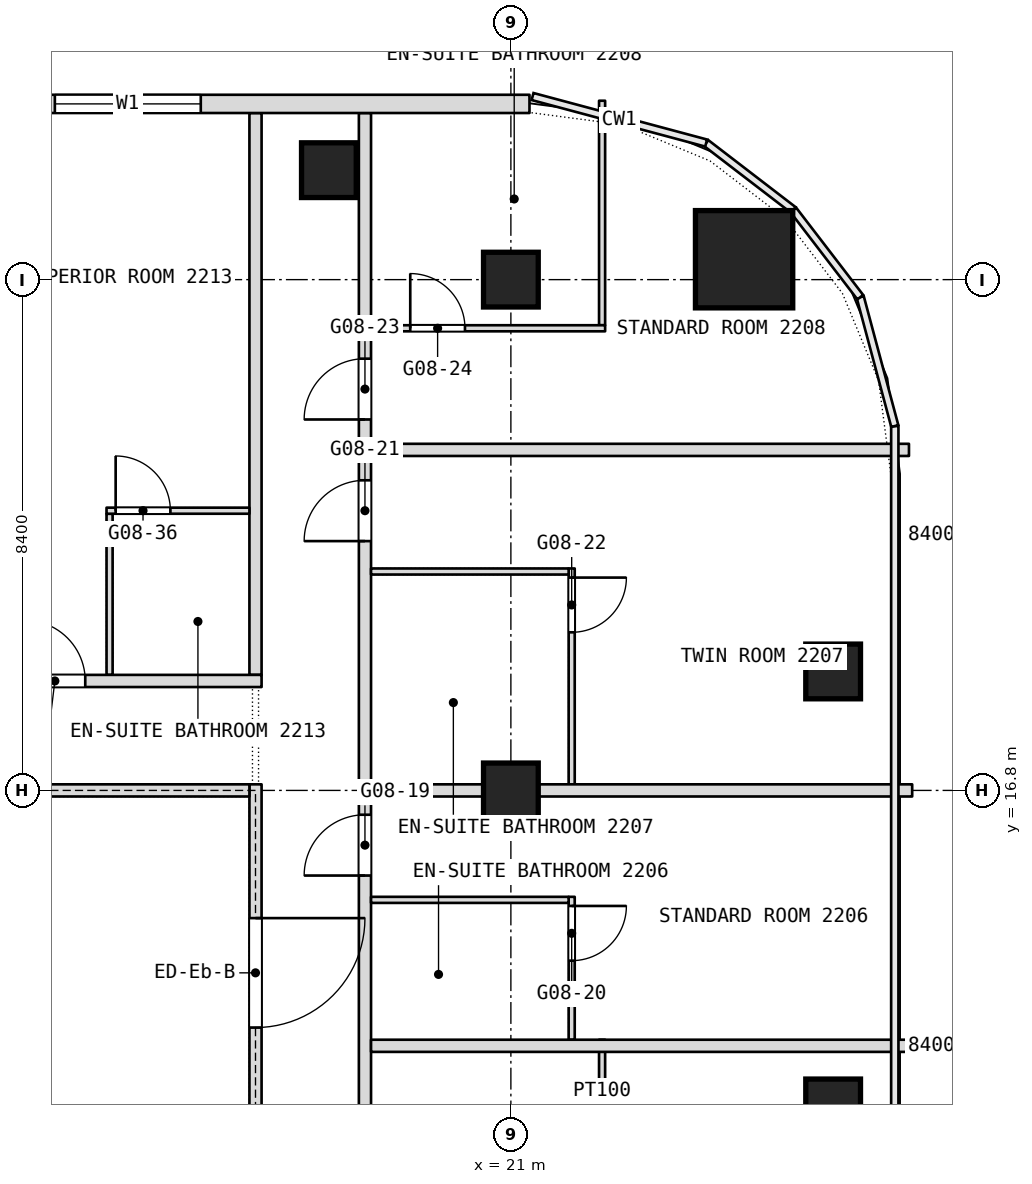
"""IFC4 building model, lengths in metres.
Left out: names, types, materials, properties, quantities, classifications, styles, units other than length and angle.
Written with IfcOpenShell. Run it as: python <this file> out.ifc"""

import sys

from ifc_helpers import new_model, si_unit, direction, frame, frame_2d, origin, origin_2d, place, context, subcontext, project, spatial, rectangle, extrude, element, fill, save


model = new_model("IFC4")
c1 = context("Model", 3, precision=1e-05, world=origin(), true_north=direction((0.0, 1.0)))
c2 = subcontext(c1, "Body", "Model", "MODEL_VIEW")
j1 = project(units=[si_unit("LENGTHUNIT", "METRE"), si_unit("PLANEANGLEUNIT", "RADIAN")], contexts=[c1])
p1 = place(None, origin())
s1 = spatial("IfcSite", under=j1, at=p1, CompositionType="ELEMENT")
p2 = place(p1, origin())
s2 = spatial("IfcBuilding", under=s1, at=p2, CompositionType="ELEMENT")
p3 = place(p2, frame((0.0, 0.0, 104.9)))
s3 = spatial("IfcBuildingStorey", under=s2, at=p3, CompositionType="ELEMENT", Elevation=104.9)
p4 = place(p3, frame((24.835, 25.535, 0.0), z_axis=(0.0, 0.0, 1.0), x_axis=(1.0, 0.0, 0.0)))
e1 = element("IfcColumn", 1, at=p4, inside=s3, PredefinedType="COLUMN", context=c2, shape_type="SweptSolid", body=[
    extrude(rectangle(XDim=1.6, YDim=1.6, at=origin_2d()), origin(), (0.0, 0.0, 1.0), 3.6),
])
for number, where, z_axis, x_axis in (
    (2, (21.0, 16.8, 0.0), (0.0, 0.0, 1.0), (1.0, 0.0, 0.0)),
    (3, (21.0, 25.2, 0.0), (0.0, 0.0, 1.0), (1.0, 0.0, 0.0)),
    (4, (18.007, 27.0, 0.0), (0.0, 0.0, 1.0), (1.0, 0.0, 0.0)),
    (5, (26.3, 18.756, 0.0), (0.0, 0.0, 1.0), (1.0, 0.0, 0.0)),
    (6, (26.3, 11.603, 0.0), (0.0, 0.0, 1.0), (1.0, 0.0, 0.0)),
):
    element("IfcColumn", number, at=place(p3, frame(where, z_axis=z_axis, x_axis=x_axis)), inside=s3, PredefinedType="COLUMN", context=c2, shape_type="SweptSolid", body=[
        extrude(rectangle(XDim=0.9, YDim=0.9, at=origin_2d()), origin(), (0.0, 0.0, 1.0), 3.6),
    ])
p5 = place(p3, frame((22.5, 10.25, 0.0), z_axis=(0.0, 0.0, 1.0), x_axis=(0.0, 1.0, 0.0)))
e7 = element("IfcWall", 7, at=p5, inside=s3, PredefinedType="PARTITIONING", context=c2, shape_type="SweptSolid", body=[
    extrude(rectangle(XDim=2.45, YDim=0.1, at=frame_2d((1.225, 0.0))), origin(), (0.0, 0.0, 1.0), 3.34),
])
p6 = place(p5, frame((0.15, 0.0, 0.0)))
e8 = element("IfcOpeningElement", 8, at=p6, cuts=e7, PredefinedType="OPENING", context=c2, shape_type="SweptSolid", body=[
    extrude(rectangle(XDim=0.9, YDim=2.1, at=frame_2d((0.45, 1.05))), frame((0.0, 0.05, 0.0), z_axis=(0.0, -1.0, 0.0), x_axis=(1.0, 0.0, 0.0)), (0.0, 0.0, 1.0), 0.1),
])
p7 = place(p3, frame((22.5, 24.45, 0.0), z_axis=(0.0, 0.0, 1.0), x_axis=(0.0, 1.0, 0.0)))
e9 = element("IfcWall", 9, at=p7, inside=s3, PredefinedType="PARTITIONING", context=c2, shape_type="SweptSolid", body=[
    extrude(rectangle(XDim=3.692, YDim=0.1, at=frame_2d((1.846, 0.0))), origin(), (0.0, 0.0, 1.0), 3.34),
])
p8 = place(p3, frame((22.0, 12.7, 0.0), z_axis=(0.0, 0.0, 1.0), x_axis=(0.0, 1.0, 0.0)))
e10 = element("IfcWall", 10, at=p8, inside=s3, PredefinedType="PARTITIONING", context=c2, shape_type="SweptSolid", body=[
    extrude(rectangle(XDim=2.35, YDim=0.1, at=frame_2d((1.175, 0.0))), origin(), (0.0, 0.0, 1.0), 3.34),
])
p9 = place(p8, frame((1.3, 0.0, 0.0)))
e11 = element("IfcOpeningElement", 11, at=p9, cuts=e10, PredefinedType="OPENING", context=c2, shape_type="SweptSolid", body=[
    extrude(rectangle(XDim=0.9, YDim=2.1, at=frame_2d((0.45, 1.05))), frame((0.0, 0.05, 0.0), z_axis=(0.0, -1.0, 0.0), x_axis=(1.0, 0.0, 0.0)), (0.0, 0.0, 1.0), 0.1),
])
p10 = place(p3, frame((22.0, 16.9, 0.0), z_axis=(0.0, 0.0, 1.0), x_axis=(0.0, 1.0, 0.0)))
e12 = element("IfcWall", 12, at=p10, inside=s3, PredefinedType="PARTITIONING", context=c2, shape_type="SweptSolid", body=[
    extrude(rectangle(XDim=3.55, YDim=0.1, at=frame_2d((1.775, 0.0))), origin(), (0.0, 0.0, 1.0), 3.34),
])
p11 = place(p10, frame((2.5, 0.0, 0.0)))
e13 = element("IfcOpeningElement", 13, at=p11, cuts=e12, PredefinedType="OPENING", context=c2, shape_type="SweptSolid", body=[
    extrude(rectangle(XDim=0.9, YDim=2.1, at=frame_2d((0.45, 1.05))), frame((0.0, 0.05, 0.0), z_axis=(0.0, -1.0, 0.0), x_axis=(1.0, 0.0, 0.0)), (0.0, 0.0, 1.0), 0.1),
])
p12 = place(p3, frame((18.6, -21.708, 0.0), z_axis=(0.0, 0.0, 1.0), x_axis=(0.0, 1.0, 0.0)))
e14 = element("IfcWall", 14, at=p12, inside=s3, PredefinedType="PARTITIONING", context=c2, shape_type="SweptSolid", body=[
    extrude(rectangle(XDim=49.648, YDim=0.2, at=frame_2d((24.824, 0.0))), origin(), (0.0, 0.0, 1.0), 3.34),
])
p13 = place(p12, frame((2.204, 0.0, 0.0)))
e15 = element("IfcOpeningElement", 15, at=p13, cuts=e14, PredefinedType="OPENING", context=c2, shape_type="SweptSolid", body=[
    extrude(rectangle(XDim=1.0, YDim=2.1, at=frame_2d((0.5, 1.05))), frame((0.0, 0.1, 0.0), z_axis=(0.0, -1.0, 0.0), x_axis=(1.0, 0.0, 0.0)), (0.0, 0.0, 1.0), 0.2),
])
p14 = place(p12, frame((7.708, 0.0, 0.0)))
e16 = element("IfcOpeningElement", 16, at=p14, cuts=e14, PredefinedType="OPENING", context=c2, shape_type="SweptSolid", body=[
    extrude(rectangle(XDim=1.0, YDim=2.1, at=frame_2d((0.5, 1.05))), frame((0.0, 0.1, 0.0), z_axis=(0.0, -1.0, 0.0), x_axis=(1.0, 0.0, 0.0)), (0.0, 0.0, 1.0), 0.2),
])
p15 = place(p12, frame((9.508, 0.0, 0.0)))
e17 = element("IfcOpeningElement", 17, at=p15, cuts=e14, PredefinedType="OPENING", context=c2, shape_type="SweptSolid", body=[
    extrude(rectangle(XDim=1.0, YDim=2.1, at=frame_2d((0.5, 1.05))), frame((0.0, 0.1, 0.0), z_axis=(0.0, -1.0, 0.0), x_axis=(1.0, 0.0, 0.0)), (0.0, 0.0, 1.0), 0.2),
])
p16 = place(p12, frame((13.708, 0.0, 0.0)))
e18 = element("IfcOpeningElement", 18, at=p16, cuts=e14, PredefinedType="OPENING", context=c2, shape_type="SweptSolid", body=[
    extrude(rectangle(XDim=1.0, YDim=2.1, at=frame_2d((0.5, 1.05))), frame((0.0, 0.1, 0.0), z_axis=(0.0, -1.0, 0.0), x_axis=(1.0, 0.0, 0.0)), (0.0, 0.0, 1.0), 0.2),
])
p17 = place(p12, frame((20.308, 0.0, 0.0)))
e19 = element("IfcOpeningElement", 19, at=p17, cuts=e14, PredefinedType="OPENING", context=c2, shape_type="SweptSolid", body=[
    extrude(rectangle(XDim=1.0, YDim=2.1, at=frame_2d((0.5, 1.05))), frame((0.0, 0.1, 0.0), z_axis=(0.0, -1.0, 0.0), x_axis=(1.0, 0.0, 0.0)), (0.0, 0.0, 1.0), 0.2),
])
p18 = place(p12, frame((25.008, 0.0, 0.0)))
e20 = element("IfcOpeningElement", 20, at=p18, cuts=e14, PredefinedType="OPENING", context=c2, shape_type="SweptSolid", body=[
    extrude(rectangle(XDim=1.8, YDim=2.1, at=frame_2d((0.9, 1.05))), frame((0.0, 0.1, 0.0), z_axis=(0.0, -1.0, 0.0), x_axis=(1.0, 0.0, 0.0)), (0.0, 0.0, 1.0), 0.2),
])
p19 = place(p12, frame((30.508, 0.0, 0.0)))
e21 = element("IfcOpeningElement", 21, at=p19, cuts=e14, PredefinedType="OPENING", context=c2, shape_type="SweptSolid", body=[
    extrude(rectangle(XDim=1.0, YDim=2.1, at=frame_2d((0.5, 1.05))), frame((0.0, 0.1, 0.0), z_axis=(0.0, -1.0, 0.0), x_axis=(1.0, 0.0, 0.0)), (0.0, 0.0, 1.0), 0.2),
])
p20 = place(p12, frame((37.108, 0.0, 0.0)))
e22 = element("IfcOpeningElement", 22, at=p20, cuts=e14, PredefinedType="OPENING", context=c2, shape_type="SweptSolid", body=[
    extrude(rectangle(XDim=1.0, YDim=2.1, at=frame_2d((0.5, 1.05))), frame((0.0, 0.1, 0.0), z_axis=(0.0, -1.0, 0.0), x_axis=(1.0, 0.0, 0.0)), (0.0, 0.0, 1.0), 0.2),
])
p21 = place(p12, frame((42.608, 0.0, 0.0)))
e23 = element("IfcOpeningElement", 23, at=p21, cuts=e14, PredefinedType="OPENING", context=c2, shape_type="SweptSolid", body=[
    extrude(rectangle(XDim=1.0, YDim=2.1, at=frame_2d((0.5, 1.05))), frame((0.0, 0.1, 0.0), z_axis=(0.0, -1.0, 0.0), x_axis=(1.0, 0.0, 0.0)), (0.0, 0.0, 1.0), 0.2),
])
p22 = place(p12, frame((44.608, 0.0, 0.0)))
e24 = element("IfcOpeningElement", 24, at=p22, cuts=e14, PredefinedType="OPENING", context=c2, shape_type="SweptSolid", body=[
    extrude(rectangle(XDim=1.0, YDim=2.1, at=frame_2d((0.5, 1.05))), frame((0.0, 0.1, 0.0), z_axis=(0.0, -1.0, 0.0), x_axis=(1.0, 0.0, 0.0)), (0.0, 0.0, 1.0), 0.2),
])
p23 = place(p3, frame((16.8, 18.7, 0.0), z_axis=(0.0, 0.0, 1.0), x_axis=(0.0, 1.0, 0.0)))
e25 = element("IfcWall", 25, at=p23, inside=s3, PredefinedType="PARTITIONING", context=c2, shape_type="SweptSolid", body=[
    extrude(rectangle(XDim=9.24, YDim=0.2, at=frame_2d((4.62, 0.0))), origin(), (0.0, 0.0, 1.0), 3.34),
])
p24 = place(p3, frame((14.4, 18.7, 0.0), z_axis=(0.0, 0.0, 1.0), x_axis=(0.0, 1.0, 0.0)))
e26 = element("IfcWall", 26, at=p24, inside=s3, PredefinedType="PARTITIONING", context=c2, shape_type="SweptSolid", body=[
    extrude(rectangle(XDim=2.65, YDim=0.1, at=frame_2d((1.325, 0.0))), origin(), (0.0, 0.0, 1.0), 3.34),
])
p25 = place(p3, frame((18.7, 12.6, 0.0), z_axis=(0.0, 0.0, 1.0), x_axis=(1.0, 0.0, 0.0)))
e27 = element("IfcWall", 27, at=p25, inside=s3, PredefinedType="PARTITIONING", context=c2, shape_type="SweptSolid", body=[
    extrude(rectangle(XDim=8.9, YDim=0.2, at=frame_2d((4.45, 0.0))), origin(), (0.0, 0.0, 1.0), 3.34),
])
p26 = place(p3, frame((18.7, 15.0, 0.0), z_axis=(0.0, 0.0, 1.0), x_axis=(1.0, 0.0, 0.0)))
e28 = element("IfcWall", 28, at=p26, inside=s3, PredefinedType="PARTITIONING", context=c2, shape_type="SweptSolid", body=[
    extrude(rectangle(XDim=3.25, YDim=0.1, at=frame_2d((1.625, 0.0))), origin(), (0.0, 0.0, 1.0), 3.34),
])
p27 = place(p3, frame((18.7, 16.8, 0.0), z_axis=(0.0, 0.0, 1.0), x_axis=(1.0, 0.0, 0.0)))
e29 = element("IfcWall", 29, at=p27, inside=s3, PredefinedType="PARTITIONING", context=c2, shape_type="SweptSolid", body=[
    extrude(rectangle(XDim=8.9, YDim=0.2, at=frame_2d((4.45, 0.0))), origin(), (0.0, 0.0, 1.0), 2.89),
])
p28 = place(p3, frame((10.7, 18.6, 0.0), z_axis=(0.0, 0.0, 1.0), x_axis=(1.0, 0.0, 0.0)))
e30 = element("IfcWall", 30, at=p28, inside=s3, PredefinedType="PARTITIONING", context=c2, shape_type="SweptSolid", body=[
    extrude(rectangle(XDim=6.2, YDim=0.2, at=frame_2d((3.1, 0.0))), origin(), (0.0, 0.0, 1.0), 3.34),
])
p29 = place(p28, frame((2.3, 0.0, 0.0)))
e31 = element("IfcOpeningElement", 31, at=p29, cuts=e30, PredefinedType="OPENING", context=c2, shape_type="SweptSolid", body=[
    extrude(rectangle(XDim=1.0, YDim=2.1, at=frame_2d((0.5, 1.05))), frame((0.0, 0.1, 0.0), z_axis=(0.0, -1.0, 0.0), x_axis=(1.0, 0.0, 0.0)), (0.0, 0.0, 1.0), 0.2),
])
p30 = place(p3, frame((18.7, 20.4, 0.0), z_axis=(0.0, 0.0, 1.0), x_axis=(1.0, 0.0, 0.0)))
e32 = element("IfcWall", 32, at=p30, inside=s3, PredefinedType="PARTITIONING", context=c2, shape_type="SweptSolid", body=[
    extrude(rectangle(XDim=3.25, YDim=0.1, at=frame_2d((1.625, 0.0))), origin(), (0.0, 0.0, 1.0), 3.34),
])
p31 = place(p3, frame((14.35, 21.4, 0.0), z_axis=(0.0, 0.0, 1.0), x_axis=(1.0, 0.0, 0.0)))
e33 = element("IfcWall", 33, at=p31, inside=s3, PredefinedType="PARTITIONING", context=c2, shape_type="SweptSolid", body=[
    extrude(rectangle(XDim=2.35, YDim=0.1, at=frame_2d((1.175, 0.0))), origin(), (0.0, 0.0, 1.0), 3.34),
])
p32 = place(p31, frame((0.15, 0.0, 0.0)))
e34 = element("IfcOpeningElement", 34, at=p32, cuts=e33, PredefinedType="OPENING", context=c2, shape_type="SweptSolid", body=[
    extrude(rectangle(XDim=0.9, YDim=2.1, at=frame_2d((0.45, 1.05))), frame((0.0, 0.05, 0.0), z_axis=(0.0, -1.0, 0.0), x_axis=(1.0, 0.0, 0.0)), (0.0, 0.0, 1.0), 0.1),
])
p33 = place(p3, frame((18.7, 22.4, 0.0), z_axis=(0.0, 0.0, 1.0), x_axis=(1.0, 0.0, 0.0)))
e35 = element("IfcWall", 35, at=p33, inside=s3, PredefinedType="PARTITIONING", context=c2, shape_type="SweptSolid", body=[
    extrude(rectangle(XDim=8.847, YDim=0.2, at=frame_2d((4.424, 0.0))), origin(), (0.0, 0.0, 1.0), 3.34),
])
p34 = place(p3, frame((18.7, 24.4, 0.0), z_axis=(0.0, 0.0, 1.0), x_axis=(1.0, 0.0, 0.0)))
e36 = element("IfcWall", 36, at=p34, inside=s3, PredefinedType="PARTITIONING", context=c2, shape_type="SweptSolid", body=[
    extrude(rectangle(XDim=3.85, YDim=0.1, at=frame_2d((1.925, 0.0))), origin(), (0.0, 0.0, 1.0), 3.34),
])
p35 = place(p34, frame((0.645, 0.0, 0.0)))
e37 = element("IfcOpeningElement", 37, at=p35, cuts=e36, PredefinedType="OPENING", context=c2, shape_type="SweptSolid", body=[
    extrude(rectangle(XDim=0.9, YDim=2.1, at=frame_2d((0.45, 1.05))), frame((0.0, 0.05, 0.0), z_axis=(0.0, -1.0, 0.0), x_axis=(1.0, 0.0, 0.0)), (0.0, 0.0, 1.0), 0.1),
])
p36 = place(p3, frame((21.306, 28.09, 0.0), z_axis=(0.0, 0.0, 1.0), x_axis=(-1.0, 0.0, 0.0)))
e38 = element("IfcWall", 38, at=p36, inside=s3, PredefinedType="NOTDEFINED", context=c2, shape_type="SweptSolid", body=[
    extrude(rectangle(XDim=42.612, YDim=0.3, at=frame_2d((21.306, 0.0))), origin(), (0.0, 0.0, 1.0), 3.6),
])
p37 = place(p36, frame((5.406, 0.0, 0.9)))
e39 = element("IfcOpeningElement", 39, at=p37, cuts=e38, PredefinedType="OPENING", context=c2, shape_type="SweptSolid", body=[
    extrude(rectangle(XDim=2.4, YDim=2.1, at=frame_2d((1.2, 1.05))), frame((0.0, 0.15, 0.0), z_axis=(0.0, -1.0, 0.0), x_axis=(1.0, 0.0, 0.0)), (0.0, 0.0, 1.0), 0.3),
])
p38 = place(p36, frame((9.606, 0.0, 0.9)))
e40 = element("IfcOpeningElement", 40, at=p38, cuts=e38, PredefinedType="OPENING", context=c2, shape_type="SweptSolid", body=[
    extrude(rectangle(XDim=2.4, YDim=2.1, at=frame_2d((1.2, 1.05))), frame((0.0, 0.15, 0.0), z_axis=(0.0, -1.0, 0.0), x_axis=(1.0, 0.0, 0.0)), (0.0, 0.0, 1.0), 0.3),
])
p39 = place(p36, frame((13.806, 0.0, 0.9)))
e41 = element("IfcOpeningElement", 41, at=p39, cuts=e38, PredefinedType="OPENING", context=c2, shape_type="SweptSolid", body=[
    extrude(rectangle(XDim=2.4, YDim=2.1, at=frame_2d((1.2, 1.05))), frame((0.0, 0.15, 0.0), z_axis=(0.0, -1.0, 0.0), x_axis=(1.0, 0.0, 0.0)), (0.0, 0.0, 1.0), 0.3),
])
p40 = place(p36, frame((18.006, 0.0, 0.9)))
e42 = element("IfcOpeningElement", 42, at=p40, cuts=e38, PredefinedType="OPENING", context=c2, shape_type="SweptSolid", body=[
    extrude(rectangle(XDim=2.4, YDim=2.1, at=frame_2d((1.2, 1.05))), frame((0.0, 0.15, 0.0), z_axis=(0.0, -1.0, 0.0), x_axis=(1.0, 0.0, 0.0)), (0.0, 0.0, 1.0), 0.3),
])
p41 = place(p36, frame((22.206, 0.0, 0.9)))
e43 = element("IfcOpeningElement", 43, at=p41, cuts=e38, PredefinedType="OPENING", context=c2, shape_type="SweptSolid", body=[
    extrude(rectangle(XDim=2.4, YDim=2.1, at=frame_2d((1.2, 1.05))), frame((0.0, 0.15, 0.0), z_axis=(0.0, -1.0, 0.0), x_axis=(1.0, 0.0, 0.0)), (0.0, 0.0, 1.0), 0.3),
])
p42 = place(p36, frame((26.406, 0.0, 0.9)))
e44 = element("IfcOpeningElement", 44, at=p42, cuts=e38, PredefinedType="OPENING", context=c2, shape_type="SweptSolid", body=[
    extrude(rectangle(XDim=2.4, YDim=2.1, at=frame_2d((1.2, 1.05))), frame((0.0, 0.15, 0.0), z_axis=(0.0, -1.0, 0.0), x_axis=(1.0, 0.0, 0.0)), (0.0, 0.0, 1.0), 0.3),
])
p43 = place(p36, frame((30.606, 0.0, 0.9)))
e45 = element("IfcOpeningElement", 45, at=p43, cuts=e38, PredefinedType="OPENING", context=c2, shape_type="SweptSolid", body=[
    extrude(rectangle(XDim=2.4, YDim=2.1, at=frame_2d((1.2, 1.05))), frame((0.0, 0.15, 0.0), z_axis=(0.0, -1.0, 0.0), x_axis=(1.0, 0.0, 0.0)), (0.0, 0.0, 1.0), 0.3),
])
p44 = place(p36, frame((34.806, 0.0, 0.9)))
e46 = element("IfcOpeningElement", 46, at=p44, cuts=e38, PredefinedType="OPENING", context=c2, shape_type="SweptSolid", body=[
    extrude(rectangle(XDim=2.4, YDim=2.1, at=frame_2d((1.2, 1.05))), frame((0.0, 0.15, 0.0), z_axis=(0.0, -1.0, 0.0), x_axis=(1.0, 0.0, 0.0)), (0.0, 0.0, 1.0), 0.3),
])
p45 = place(p3, frame((16.8, -0.1, 0.0), z_axis=(0.0, 0.0, 1.0), x_axis=(0.0, 1.0, 0.0)))
e47 = element("IfcWall", 47, at=p45, inside=s3, PredefinedType="PARTITIONING", context=c2, shape_type="SweptSolid", body=[
    extrude(rectangle(XDim=17.0, YDim=0.2, at=frame_2d((8.5, 0.0))), origin(), (0.0, 0.0, 1.0), 3.34),
])
p46 = place(p45, frame((2.2, 0.0, 0.0)))
e48 = element("IfcOpeningElement", 48, at=p46, cuts=e47, PredefinedType="OPENING", context=c2, shape_type="SweptSolid", body=[
    extrude(rectangle(XDim=1.8, YDim=2.1, at=frame_2d((0.9, 1.05))), frame((0.0, 0.1, 0.0), z_axis=(0.0, -1.0, 0.0), x_axis=(1.0, 0.0, 0.0)), (0.0, 0.0, 1.0), 0.2),
])
p47 = place(p45, frame((13.0, 0.0, 0.0)))
e49 = element("IfcOpeningElement", 49, at=p47, cuts=e47, PredefinedType="OPENING", context=c2, shape_type="SweptSolid", body=[
    extrude(rectangle(XDim=1.8, YDim=2.1, at=frame_2d((0.9, 1.05))), frame((0.0, 0.1, 0.0), z_axis=(0.0, -1.0, 0.0), x_axis=(1.0, 0.0, 0.0)), (0.0, 0.0, 1.0), 0.2),
])
p48 = place(p3, frame((12.1, 16.8, 0.0), z_axis=(0.0, 0.0, 1.0), x_axis=(1.0, 0.0, 0.0)))
e50 = element("IfcWall", 50, at=p48, inside=s3, PredefinedType="PARTITIONING", context=c2, shape_type="SweptSolid", body=[
    extrude(rectangle(XDim=4.6, YDim=0.2, at=frame_2d((2.3, 0.0))), origin(), (0.0, 0.0, 1.0), 2.89),
])
p49 = place(p9, origin())
e51 = element("IfcDoor", 51, at=p49, inside=s3, OperationType="SINGLE_SWING_RIGHT", PredefinedType="DOOR", context=c2, shape_type="SweptSolid", body=[
    extrude(rectangle(XDim=0.9, YDim=2.1, at=frame_2d((0.45, 1.05))), frame((0.0, 0.025, 0.0), z_axis=(0.0, -1.0, 0.0), x_axis=(1.0, 0.0, 0.0)), (0.0, 0.0, 1.0), 0.05),
])
fill(e11, e51)
p50 = place(p11, origin())
e52 = element("IfcDoor", 52, at=p50, inside=s3, OperationType="SINGLE_SWING_RIGHT", PredefinedType="DOOR", context=c2, shape_type="SweptSolid", body=[
    extrude(rectangle(XDim=0.9, YDim=2.1, at=frame_2d((0.45, 1.05))), frame((0.0, 0.025, 0.0), z_axis=(0.0, -1.0, 0.0), x_axis=(1.0, 0.0, 0.0)), (0.0, 0.0, 1.0), 0.05),
])
fill(e13, e52)
p51 = place(p20, origin())
e53 = element("IfcDoor", 53, at=p51, inside=s3, OperationType="SINGLE_SWING_LEFT", PredefinedType="DOOR", context=c2, shape_type="SweptSolid", body=[
    extrude(rectangle(XDim=1.0, YDim=2.1, at=frame_2d((0.5, 1.05))), frame((0.0, 0.025, 0.0), z_axis=(0.0, -1.0, 0.0), x_axis=(1.0, 0.0, 0.0)), (0.0, 0.0, 1.0), 0.05),
])
fill(e22, e53)
p52 = place(p21, origin())
e54 = element("IfcDoor", 54, at=p52, inside=s3, OperationType="SINGLE_SWING_LEFT", PredefinedType="DOOR", context=c2, shape_type="SweptSolid", body=[
    extrude(rectangle(XDim=1.0, YDim=2.1, at=frame_2d((0.5, 1.05))), frame((0.0, 0.025, 0.0), z_axis=(0.0, -1.0, 0.0), x_axis=(1.0, 0.0, 0.0)), (0.0, 0.0, 1.0), 0.05),
])
fill(e23, e54)
p53 = place(p22, origin())
e55 = element("IfcDoor", 55, at=p53, inside=s3, OperationType="SINGLE_SWING_LEFT", PredefinedType="DOOR", context=c2, shape_type="SweptSolid", body=[
    extrude(rectangle(XDim=1.0, YDim=2.1, at=frame_2d((0.5, 1.05))), frame((0.0, 0.025, 0.0), z_axis=(0.0, -1.0, 0.0), x_axis=(1.0, 0.0, 0.0)), (0.0, 0.0, 1.0), 0.05),
])
fill(e24, e55)
p54 = place(p29, origin())
e56 = element("IfcDoor", 56, at=p54, inside=s3, OperationType="SINGLE_SWING_RIGHT", PredefinedType="DOOR", context=c2, shape_type="SweptSolid", body=[
    extrude(rectangle(XDim=1.0, YDim=2.1, at=frame_2d((0.5, 1.05))), frame((0.0, 0.025, 0.0), z_axis=(0.0, -1.0, 0.0), x_axis=(1.0, 0.0, 0.0)), (0.0, 0.0, 1.0), 0.05),
])
fill(e31, e56)
p55 = place(p32, origin())
e57 = element("IfcDoor", 57, at=p55, inside=s3, OperationType="SINGLE_SWING_RIGHT", PredefinedType="DOOR", context=c2, shape_type="SweptSolid", body=[
    extrude(rectangle(XDim=0.9, YDim=2.1, at=frame_2d((0.45, 1.05))), frame((0.0, 0.025, 0.0), z_axis=(0.0, -1.0, 0.0), x_axis=(1.0, 0.0, 0.0)), (0.0, 0.0, 1.0), 0.05),
])
fill(e34, e57)
p56 = place(p35, origin())
e58 = element("IfcDoor", 58, at=p56, inside=s3, OperationType="SINGLE_SWING_RIGHT", PredefinedType="DOOR", context=c2, shape_type="SweptSolid", body=[
    extrude(rectangle(XDim=0.9, YDim=2.1, at=frame_2d((0.45, 1.05))), frame((0.0, 0.025, 0.0), z_axis=(0.0, -1.0, 0.0), x_axis=(1.0, 0.0, 0.0)), (0.0, 0.0, 1.0), 0.05),
])
fill(e37, e58)
p57 = place(p37, origin())
e59 = element("IfcWindow", 59, at=p57, inside=s3, PartitioningType="SINGLE_PANEL", PredefinedType="WINDOW", context=c2, shape_type="SweptSolid", body=[
    extrude(rectangle(XDim=2.4, YDim=2.1, at=frame_2d((1.2, 1.05))), frame((0.0, 0.03, 0.0), z_axis=(0.0, -1.0, 0.0), x_axis=(1.0, 0.0, 0.0)), (0.0, 0.0, 1.0), 0.06),
])
fill(e39, e59)
p58 = place(p47, origin())
e60 = element("IfcDoor", 60, at=p58, inside=s3, OperationType="DOUBLE_DOOR_SINGLE_SWING", PredefinedType="DOOR", context=c2, shape_type="SweptSolid", body=[
    extrude(rectangle(XDim=1.8, YDim=2.1, at=frame_2d((0.9, 1.05))), frame((0.0, 0.025, 0.0), z_axis=(0.0, -1.0, 0.0), x_axis=(1.0, 0.0, 0.0)), (0.0, 0.0, 1.0), 0.05),
])
fill(e49, e60)
save(model, sys.argv[1])
